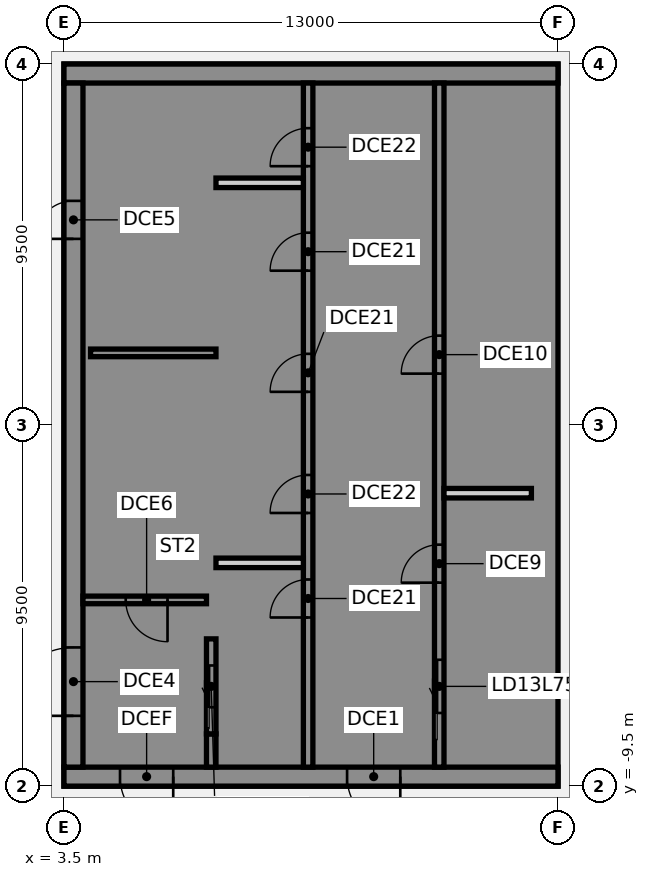
"""IFC4 building model, lengths in metres.
Left out: names, types, materials, properties, quantities, classifications, styles, units other than length and angle.
Written with IfcOpenShell. Run it as: python <this file> out.ifc"""

import sys

from ifc_helpers import new_model, si_unit, direction, frame, frame_2d, origin, place, context, subcontext, project, spatial, polyline, rectangle, outline, extrude, element, fill, save


model = new_model("IFC4")
c1 = context("Model", 3, precision=1e-05, world=origin(), true_north=direction((0.0, 1.0)))
c2 = subcontext(c1, "Body", "Model", "MODEL_VIEW")
j1 = project(units=[si_unit("LENGTHUNIT", "METRE"), si_unit("PLANEANGLEUNIT", "RADIAN")], contexts=[c1])
p1 = place(None, origin())
s1 = spatial("IfcSite", under=j1, at=p1, CompositionType="ELEMENT")
p2 = place(p1, origin())
s2 = spatial("IfcBuilding", under=s1, at=p2, CompositionType="ELEMENT")
p3 = place(p2, frame((0.0, 0.0, 305.4)))
s3 = spatial("IfcBuildingStorey", under=s2, at=p3, CompositionType="ELEMENT", Elevation=305.4)
p4 = place(p3, frame((16.5, -9.25, 0.0), z_axis=(0.0, 0.0, 1.0), x_axis=(-1.0, 0.0, 0.0)))
e1 = element("IfcWall", 1, at=p4, inside=s3, PredefinedType="SHEAR", context=c2, shape_type="SweptSolid", body=[
    extrude(rectangle(XDim=13.0, YDim=0.5, at=frame_2d((6.5, 0.0))), origin(), (0.0, 0.0, 1.0), 3.82),
])
p5 = place(p4, frame((4.15, 0.0, 0.0)))
e2 = element("IfcOpeningElement", 2, at=p5, cuts=e1, PredefinedType="OPENING", context=c2, shape_type="SweptSolid", body=[
    extrude(rectangle(XDim=1.4, YDim=2.1, at=frame_2d((0.7, 1.05))), frame((0.0, 0.26, 0.0), z_axis=(0.0, -1.0, 0.0), x_axis=(1.0, 0.0, 0.0)), (0.0, 0.0, 1.0), 0.52),
])
p6 = place(p4, frame((10.125, 0.0, 0.0)))
e3 = element("IfcOpeningElement", 3, at=p6, cuts=e1, PredefinedType="OPENING", context=c2, shape_type="SweptSolid", body=[
    extrude(rectangle(XDim=1.4, YDim=2.1, at=frame_2d((0.7, 1.05))), frame((0.0, 0.26, 0.0), z_axis=(0.0, -1.0, 0.0), x_axis=(1.0, 0.0, 0.0)), (0.0, 0.0, 1.0), 0.52),
])
p7 = place(p3, origin())
e4 = element("IfcWall", 4, at=p7, inside=s3, PredefinedType="SHEAR", context=c2, shape_type="SweptSolid", body=[
    extrude(outline(polyline([(13.5, -8.125), (13.5, -9.0), (16.0, -9.0), (16.5, -9.0), (16.5, 9.0), (16.0, 9.0), (13.5, 9.0), (13.5, 8.125), (16.0, 8.125), (16.0, 5.625), (13.5, 5.625), (13.5, 5.375), (16.0, 5.375), (16.0, -5.375), (13.5, -5.375), (13.5, -5.625), (16.0, -5.625), (16.0, -8.125), (13.5, -8.125)])), origin(), (0.0, 0.0, 1.0), 3.82),
])
p8 = place(p3, frame((16.5, 9.25, 0.0), z_axis=(0.0, 0.0, 1.0), x_axis=(-1.0, 0.0, 0.0)))
e5 = element("IfcWall", 5, at=p8, inside=s3, PredefinedType="SHEAR", context=c2, shape_type="SweptSolid", body=[
    extrude(rectangle(XDim=13.0, YDim=0.5, at=frame_2d((6.5, 0.0))), origin(), (0.0, 0.0, 1.0), 3.82),
])
p9 = place(p3, origin())
e6 = element("IfcWall", 6, at=p9, inside=s3, PredefinedType="SHEAR", context=c2, shape_type="SweptSolid", body=[
    extrude(outline(polyline([(9.8, -5.625), (9.8, -5.375), (7.5, -5.375), (7.5, 8.125), (9.8, 8.125), (9.8, 9.0), (7.5, 9.0), (7.25, 9.0), (7.25, -5.625), (7.5, -5.625), (9.8, -5.625)])), origin(), (0.0, 0.0, 1.0), 3.82),
])
p10 = place(p3, origin())
e7 = element("IfcWall", 7, at=p10, inside=s3, PredefinedType="SHEAR", context=c2, shape_type="SweptSolid", body=[
    extrude(outline(polyline([(7.5, -8.125), (7.5, -9.0), (9.8, -9.0), (9.8, -8.125), (9.8, -5.625), (9.55, -5.625), (9.55, -8.125), (7.5, -8.125)])), origin(), (0.0, 0.0, 1.0), 3.82),
])
p11 = place(p3, frame((7.375, -9.0, 0.0), z_axis=(0.0, 0.0, 1.0), x_axis=(0.0, 1.0, 0.0)))
e8 = element("IfcWall", 8, at=p11, inside=s3, PredefinedType="SHEAR", context=c2, shape_type="SweptSolid", body=[
    extrude(rectangle(XDim=0.875, YDim=0.25, at=frame_2d((0.438, 0.0))), origin(), (0.0, 0.0, 1.0), 3.82),
])
p12 = place(p3, frame((7.5, 1.9, 0.0), z_axis=(0.0, 0.0, 1.0), x_axis=(-1.0, 0.0, 0.0)))
e9 = element("IfcWall", 9, at=p12, inside=s3, PredefinedType="SHEAR", context=c2, shape_type="SweptSolid", body=[
    extrude(rectangle(XDim=3.3, YDim=0.2, at=frame_2d((1.65, 0.0))), origin(), (0.0, 0.0, 1.0), 3.82),
])
p13 = place(p3, frame((13.375, -9.0, 0.0), z_axis=(0.0, 0.0, 1.0), x_axis=(0.0, 1.0, 0.0)))
e10 = element("IfcWall", 10, at=p13, inside=s3, PredefinedType="SHEAR", context=c2, shape_type="SweptSolid", body=[
    extrude(rectangle(XDim=18.0, YDim=0.25, at=frame_2d((9.0, 0.0))), origin(), (0.0, 0.0, 1.0), 3.82),
])
p14 = place(p13, frame((1.425, 0.0, 0.0)))
e11 = element("IfcOpeningElement", 11, at=p14, cuts=e10, PredefinedType="OPENING", context=c2, shape_type="SweptSolid", body=[
    extrude(rectangle(XDim=1.4, YDim=2.1, at=frame_2d((0.7, 1.05))), frame((0.0, 0.135, 0.0), z_axis=(0.0, -1.0, 0.0), x_axis=(1.0, 0.0, 0.0)), (0.0, 0.0, 1.0), 0.27),
])
p15 = place(p13, frame((4.854, 0.0, 0.0)))
e12 = element("IfcOpeningElement", 12, at=p15, cuts=e10, PredefinedType="OPENING", context=c2, shape_type="SweptSolid", body=[
    extrude(rectangle(XDim=1.0, YDim=2.1, at=frame_2d((0.5, 1.05))), frame((0.0, 0.135, 0.0), z_axis=(0.0, -1.0, 0.0), x_axis=(1.0, 0.0, 0.0)), (0.0, 0.0, 1.0), 0.27),
])
p16 = place(p13, frame((10.354, 0.0, 0.0)))
e13 = element("IfcOpeningElement", 13, at=p16, cuts=e10, PredefinedType="OPENING", context=c2, shape_type="SweptSolid", body=[
    extrude(rectangle(XDim=1.0, YDim=2.1, at=frame_2d((0.5, 1.05))), frame((0.0, 0.135, 0.0), z_axis=(0.0, -1.0, 0.0), x_axis=(1.0, 0.0, 0.0)), (0.0, 0.0, 1.0), 0.27),
])
p17 = place(p3, frame((9.925, -9.0, 0.0), z_axis=(0.0, 0.0, 1.0), x_axis=(0.0, 1.0, 0.0)))
e14 = element("IfcWall", 14, at=p17, inside=s3, PredefinedType="SHEAR", context=c2, shape_type="SweptSolid", body=[
    extrude(rectangle(XDim=18.0, YDim=0.25, at=frame_2d((9.0, 0.0))), origin(), (0.0, 0.0, 1.0), 3.82),
])
p18 = place(p17, frame((3.938, 0.0, 0.0)))
e15 = element("IfcOpeningElement", 15, at=p18, cuts=e14, PredefinedType="OPENING", context=c2, shape_type="SweptSolid", body=[
    extrude(rectangle(XDim=1.0, YDim=2.1, at=frame_2d((0.5, 1.05))), frame((0.0, 0.135, 0.0), z_axis=(0.0, -1.0, 0.0), x_axis=(1.0, 0.0, 0.0)), (0.0, 0.0, 1.0), 0.27),
])
p19 = place(p17, frame((6.688, 0.0, 0.0)))
e16 = element("IfcOpeningElement", 16, at=p19, cuts=e14, PredefinedType="OPENING", context=c2, shape_type="SweptSolid", body=[
    extrude(rectangle(XDim=1.0, YDim=2.1, at=frame_2d((0.5, 1.05))), frame((0.0, 0.135, 0.0), z_axis=(0.0, -1.0, 0.0), x_axis=(1.0, 0.0, 0.0)), (0.0, 0.0, 1.0), 0.27),
])
p20 = place(p17, frame((9.875, 0.0, 0.0)))
e17 = element("IfcOpeningElement", 17, at=p20, cuts=e14, PredefinedType="OPENING", context=c2, shape_type="SweptSolid", body=[
    extrude(rectangle(XDim=1.0, YDim=2.1, at=frame_2d((0.5, 1.05))), frame((0.0, 0.135, 0.0), z_axis=(0.0, -1.0, 0.0), x_axis=(1.0, 0.0, 0.0)), (0.0, 0.0, 1.0), 0.27),
])
p21 = place(p17, frame((13.062, 0.0, 0.0)))
e18 = element("IfcOpeningElement", 18, at=p21, cuts=e14, PredefinedType="OPENING", context=c2, shape_type="SweptSolid", body=[
    extrude(rectangle(XDim=1.0, YDim=2.1, at=frame_2d((0.5, 1.05))), frame((0.0, 0.135, 0.0), z_axis=(0.0, -1.0, 0.0), x_axis=(1.0, 0.0, 0.0)), (0.0, 0.0, 1.0), 0.27),
])
p22 = place(p17, frame((15.812, 0.0, 0.0)))
e19 = element("IfcOpeningElement", 19, at=p22, cuts=e14, PredefinedType="OPENING", context=c2, shape_type="SweptSolid", body=[
    extrude(rectangle(XDim=1.0, YDim=2.1, at=frame_2d((0.5, 1.05))), frame((0.0, 0.135, 0.0), z_axis=(0.0, -1.0, 0.0), x_axis=(1.0, 0.0, 0.0)), (0.0, 0.0, 1.0), 0.27),
])
p23 = place(p3, frame((7.375, -8.125, 0.0), z_axis=(0.0, 0.0, 1.0), x_axis=(0.0, 1.0, 0.0)))
e20 = element("IfcWall", 20, at=p23, inside=s3, PredefinedType="SHEAR", context=c2, shape_type="SweptSolid", body=[
    extrude(rectangle(XDim=2.5, YDim=0.25, at=frame_2d((1.25, 0.0))), origin(), (0.0, 0.0, 1.0), 3.82),
])
p24 = place(p23, frame((0.7, 0.0, 0.0)))
e21 = element("IfcOpeningElement", 21, at=p24, cuts=e20, PredefinedType="OPENING", context=c2, shape_type="SweptSolid", body=[
    extrude(rectangle(XDim=1.1, YDim=2.1, at=frame_2d((0.55, 1.05))), frame((0.0, 0.135, 0.0), z_axis=(0.0, -1.0, 0.0), x_axis=(1.0, 0.0, 0.0)), (0.0, 0.0, 1.0), 0.27),
])
p25 = place(p3, frame((3.75, -9.0, 0.0), z_axis=(0.0, 0.0, 1.0), x_axis=(0.0, 1.0, 0.0)))
e22 = element("IfcWall", 22, at=p25, inside=s3, PredefinedType="SHEAR", context=c2, shape_type="SweptSolid", body=[
    extrude(rectangle(XDim=18.0, YDim=0.5, at=frame_2d((9.0, 0.0))), origin(), (0.0, 0.0, 1.0), 3.82),
])
p26 = place(p25, frame((1.35, 0.0, 0.0)))
e23 = element("IfcOpeningElement", 23, at=p26, cuts=e22, PredefinedType="OPENING", context=c2, shape_type="SweptSolid", body=[
    extrude(rectangle(XDim=1.8, YDim=2.1, at=frame_2d((0.9, 1.05))), frame((0.0, 0.26, 0.0), z_axis=(0.0, -1.0, 0.0), x_axis=(1.0, 0.0, 0.0)), (0.0, 0.0, 1.0), 0.52),
])
p27 = place(p25, frame((13.9, 0.0, 0.0)))
e24 = element("IfcOpeningElement", 24, at=p27, cuts=e22, PredefinedType="OPENING", context=c2, shape_type="SweptSolid", body=[
    extrude(rectangle(XDim=1.0, YDim=2.1, at=frame_2d((0.5, 1.05))), frame((0.0, 0.26, 0.0), z_axis=(0.0, -1.0, 0.0), x_axis=(1.0, 0.0, 0.0)), (0.0, 0.0, 1.0), 0.52),
])
p28 = place(p3, frame((7.25, -4.6, 0.0), z_axis=(0.0, 0.0, 1.0), x_axis=(-1.0, 0.0, 0.0)))
e25 = element("IfcWall", 25, at=p28, inside=s3, PredefinedType="SHEAR", context=c2, shape_type="SweptSolid", body=[
    extrude(rectangle(XDim=3.25, YDim=0.2, at=frame_2d((1.625, 0.0))), origin(), (0.0, 0.0, 1.0), 3.82),
])
p29 = place(p28, frame((1.025, 0.0, 0.0)))
e26 = element("IfcOpeningElement", 26, at=p29, cuts=e25, PredefinedType="OPENING", context=c2, shape_type="SweptSolid", body=[
    extrude(rectangle(XDim=1.1, YDim=2.1, at=frame_2d((0.55, 1.05))), frame((0.0, 0.11, 0.0), z_axis=(0.0, -1.0, 0.0), x_axis=(1.0, 0.0, 0.0)), (0.0, 0.0, 1.0), 0.22),
])
for number, where, z_axis, x_axis in (
    (27, (15.8, -1.792, 0.0), (0.0, 0.0, 1.0), (-1.0, 0.0, 0.0)),
    (28, (9.8, -3.625, 0.0), (0.0, 0.0, 1.0), (-1.0, 0.0, 0.0)),
    (29, (9.8, 6.375, 0.0), (0.0, 0.0, 1.0), (-1.0, 0.0, 0.0)),
):
    element("IfcWall", number, at=place(p3, frame(where, z_axis=z_axis, x_axis=x_axis)), inside=s3, PredefinedType="PARTITIONING", context=c2, shape_type="SweptSolid", body=[
        extrude(rectangle(XDim=2.3, YDim=0.25, at=frame_2d((1.15, 0.0))), origin(), (0.0, 0.0, 1.0), 3.82),
    ])
p30 = place(p5, origin())
e30 = element("IfcDoor", 30, at=p30, inside=s3, OperationType="SINGLE_SWING_LEFT", PredefinedType="DOOR", context=c2, shape_type="SweptSolid", body=[
    extrude(rectangle(XDim=1.4, YDim=2.1, at=frame_2d((0.7, 1.05))), frame((0.0, 0.025, 0.0), z_axis=(0.0, -1.0, 0.0), x_axis=(1.0, 0.0, 0.0)), (0.0, 0.0, 1.0), 0.05),
])
fill(e2, e30)
p31 = place(p6, origin())
e31 = element("IfcDoor", 31, at=p31, inside=s3, OperationType="SINGLE_SWING_LEFT", PredefinedType="DOOR", context=c2, shape_type="SweptSolid", body=[
    extrude(rectangle(XDim=1.4, YDim=2.1, at=frame_2d((0.7, 1.05))), frame((0.0, 0.025, 0.0), z_axis=(0.0, -1.0, 0.0), x_axis=(1.0, 0.0, 0.0)), (0.0, 0.0, 1.0), 0.05),
])
fill(e3, e31)
p32 = place(p26, origin())
e32 = element("IfcDoor", 32, at=p32, inside=s3, OperationType="SINGLE_SWING_LEFT", PredefinedType="DOOR", context=c2, shape_type="SweptSolid", body=[
    extrude(rectangle(XDim=1.8, YDim=2.1, at=frame_2d((0.9, 1.05))), frame((0.0, 0.025, 0.0), z_axis=(0.0, -1.0, 0.0), x_axis=(1.0, 0.0, 0.0)), (0.0, 0.0, 1.0), 0.05),
])
fill(e23, e32)
p33 = place(p27, origin())
e33 = element("IfcDoor", 33, at=p33, inside=s3, OperationType="SINGLE_SWING_LEFT", PredefinedType="DOOR", context=c2, shape_type="SweptSolid", body=[
    extrude(rectangle(XDim=1.0, YDim=2.1, at=frame_2d((0.5, 1.05))), frame((0.0, 0.025, 0.0), z_axis=(0.0, -1.0, 0.0), x_axis=(1.0, 0.0, 0.0)), (0.0, 0.0, 1.0), 0.05),
])
fill(e24, e33)
p34 = place(p29, origin())
e34 = element("IfcDoor", 34, at=p34, inside=s3, OperationType="SINGLE_SWING_LEFT", PredefinedType="DOOR", context=c2, shape_type="SweptSolid", body=[
    extrude(rectangle(XDim=1.1, YDim=2.1, at=frame_2d((0.55, 1.05))), frame((0.0, 0.025, 0.0), z_axis=(0.0, -1.0, 0.0), x_axis=(1.0, 0.0, 0.0)), (0.0, 0.0, 1.0), 0.05),
])
fill(e26, e34)
p35 = place(p14, origin())
e35 = element("IfcDoor", 35, at=p35, inside=s3, OperationType="SLIDING_TO_LEFT", PredefinedType="DOOR", context=c2, shape_type="SweptSolid", body=[
    extrude(rectangle(XDim=1.4, YDim=2.1, at=frame_2d((0.7, 1.05))), frame((0.0, 0.025, 0.0), z_axis=(0.0, -1.0, 0.0), x_axis=(1.0, 0.0, 0.0)), (0.0, 0.0, 1.0), 0.05),
])
fill(e11, e35)
p36 = place(p24, origin())
e36 = element("IfcDoor", 36, at=p36, inside=s3, OperationType="SLIDING_TO_LEFT", PredefinedType="DOOR", context=c2, shape_type="SweptSolid", body=[
    extrude(rectangle(XDim=1.1, YDim=2.1, at=frame_2d((0.55, 1.05))), frame((0.0, 0.025, 0.0), z_axis=(0.0, -1.0, 0.0), x_axis=(1.0, 0.0, 0.0)), (0.0, 0.0, 1.0), 0.05),
])
fill(e21, e36)
p37 = place(p15, origin())
e37 = element("IfcDoor", 37, at=p37, inside=s3, OperationType="SINGLE_SWING_LEFT", PredefinedType="DOOR", context=c2, shape_type="SweptSolid", body=[
    extrude(rectangle(XDim=1.0, YDim=2.1, at=frame_2d((0.5, 1.05))), frame((0.0, 0.025, 0.0), z_axis=(0.0, -1.0, 0.0), x_axis=(1.0, 0.0, 0.0)), (0.0, 0.0, 1.0), 0.05),
])
fill(e12, e37)
p38 = place(p16, origin())
e38 = element("IfcDoor", 38, at=p38, inside=s3, OperationType="SINGLE_SWING_LEFT", PredefinedType="DOOR", context=c2, shape_type="SweptSolid", body=[
    extrude(rectangle(XDim=1.0, YDim=2.1, at=frame_2d((0.5, 1.05))), frame((0.0, 0.025, 0.0), z_axis=(0.0, -1.0, 0.0), x_axis=(1.0, 0.0, 0.0)), (0.0, 0.0, 1.0), 0.05),
])
fill(e13, e38)
p39 = place(p18, origin())
e39 = element("IfcDoor", 39, at=p39, inside=s3, OperationType="SINGLE_SWING_LEFT", PredefinedType="DOOR", context=c2, shape_type="SweptSolid", body=[
    extrude(rectangle(XDim=1.0, YDim=2.1, at=frame_2d((0.5, 1.05))), frame((0.0, 0.025, 0.0), z_axis=(0.0, -1.0, 0.0), x_axis=(1.0, 0.0, 0.0)), (0.0, 0.0, 1.0), 0.05),
])
fill(e15, e39)
p40 = place(p19, origin())
e40 = element("IfcDoor", 40, at=p40, inside=s3, OperationType="SINGLE_SWING_LEFT", PredefinedType="DOOR", context=c2, shape_type="SweptSolid", body=[
    extrude(rectangle(XDim=1.0, YDim=2.1, at=frame_2d((0.5, 1.05))), frame((0.0, 0.025, 0.0), z_axis=(0.0, -1.0, 0.0), x_axis=(1.0, 0.0, 0.0)), (0.0, 0.0, 1.0), 0.05),
])
fill(e16, e40)
p41 = place(p20, origin())
e41 = element("IfcDoor", 41, at=p41, inside=s3, OperationType="SINGLE_SWING_LEFT", PredefinedType="DOOR", context=c2, shape_type="SweptSolid", body=[
    extrude(rectangle(XDim=1.0, YDim=2.1, at=frame_2d((0.5, 1.05))), frame((0.0, 0.025, 0.0), z_axis=(0.0, -1.0, 0.0), x_axis=(1.0, 0.0, 0.0)), (0.0, 0.0, 1.0), 0.05),
])
fill(e17, e41)
p42 = place(p21, origin())
e42 = element("IfcDoor", 42, at=p42, inside=s3, OperationType="SINGLE_SWING_LEFT", PredefinedType="DOOR", context=c2, shape_type="SweptSolid", body=[
    extrude(rectangle(XDim=1.0, YDim=2.1, at=frame_2d((0.5, 1.05))), frame((0.0, 0.025, 0.0), z_axis=(0.0, -1.0, 0.0), x_axis=(1.0, 0.0, 0.0)), (0.0, 0.0, 1.0), 0.05),
])
fill(e18, e42)
p43 = place(p22, origin())
e43 = element("IfcDoor", 43, at=p43, inside=s3, OperationType="SINGLE_SWING_LEFT", PredefinedType="DOOR", context=c2, shape_type="SweptSolid", body=[
    extrude(rectangle(XDim=1.0, YDim=2.1, at=frame_2d((0.5, 1.05))), frame((0.0, 0.025, 0.0), z_axis=(0.0, -1.0, 0.0), x_axis=(1.0, 0.0, 0.0)), (0.0, 0.0, 1.0), 0.05),
])
fill(e19, e43)
save(model, sys.argv[1])
